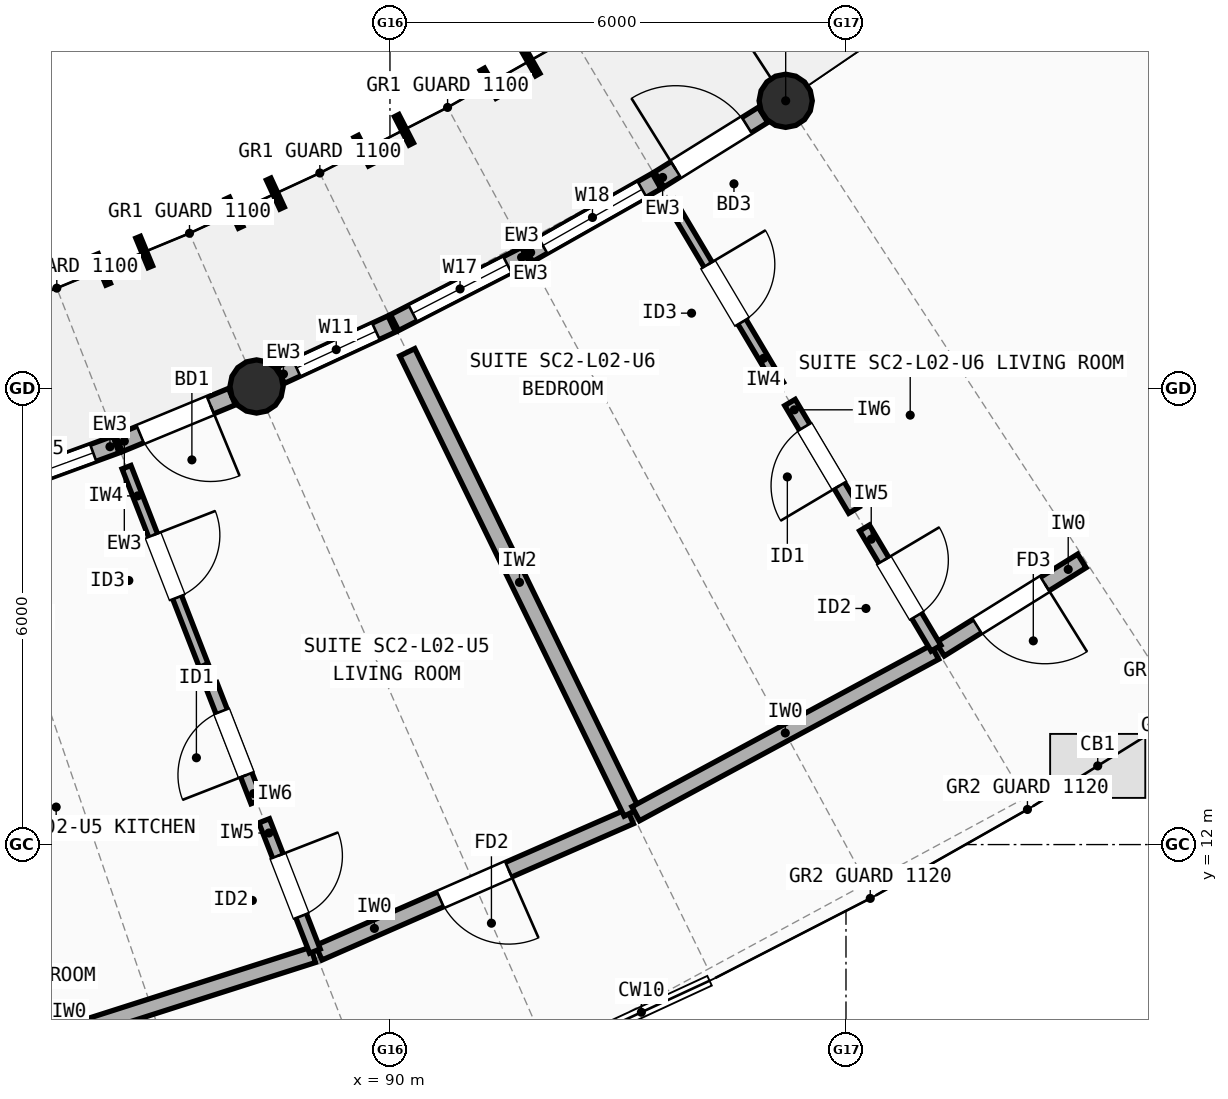
"""IFC4 building model, lengths in metres.
Left out: names, types, materials, properties, quantities, classifications, styles, units other than length and angle.
Written with IfcOpenShell. Run it as: python <this file> out.ifc"""

import sys

from ifc_helpers import new_model, si_unit, direction, frame, frame_2d, origin, origin_2d, place, context, subcontext, project, spatial, rectangle, circle, extrude, element, fill, save


model = new_model("IFC4")
c1 = context("Model", 3, precision=1e-05, world=origin(), true_north=direction((0.0, 1.0)))
c2 = subcontext(c1, "Body", "Model", "MODEL_VIEW")
j1 = project(units=[si_unit("LENGTHUNIT", "METRE"), si_unit("PLANEANGLEUNIT", "RADIAN")], contexts=[c1])
p1 = place(None, origin())
s1 = spatial("IfcSite", under=j1, at=p1, CompositionType="ELEMENT")
p2 = place(p1, origin())
s2 = spatial("IfcBuilding", under=s1, at=p2, CompositionType="ELEMENT")
p3 = place(p2, frame((0.0, 0.0, 7.7)))
s3 = spatial("IfcBuildingStorey", under=s2, at=p3, CompositionType="ELEMENT", Elevation=7.7)
for number, where, z_axis, x_axis in (
    (1, (88.245, 18.027, 0.0), (0.0, 0.0, 1.0), (1.0, 0.0, 0.0)),
    (2, (95.207, 21.785, 0.0), (0.0, 0.0, 1.0), (1.0, 0.0, 0.0)),
):
    element("IfcColumn", number, at=place(p3, frame(where, z_axis=z_axis, x_axis=x_axis)), inside=s3, PredefinedType="COLUMN", context=c2, shape_type="SweptSolid", body=[
        extrude(circle(Radius=0.35, at=origin_2d()), origin(), (0.0, 0.0, 1.0), 2.948),
    ])
p4 = place(p3, frame((84.574, 16.597, 0.0), z_axis=(0.0, 0.0, 1.0), x_axis=(0.939178301307, 0.343429932235, 0.0)))
e3 = element("IfcWall", 3, at=p4, inside=s3, PredefinedType="STANDARD", context=c2, shape_type="SweptSolid", body=[
    extrude(rectangle(XDim=1.94, YDim=0.235, at=frame_2d((0.97, 0.0))), origin(), (0.0, 0.0, 1.0), 2.684),
])
p5 = place(p4, frame((0.32, 0.0, 0.85)))
e4 = element("IfcOpeningElement", 4, at=p5, cuts=e3, PredefinedType="OPENING", context=c2, shape_type="SweptSolid", body=[
    extrude(rectangle(XDim=1.3, YDim=1.45, at=frame_2d((0.65, 0.725))), frame((0.0, 0.127, 0.0), z_axis=(0.0, -1.0, 0.0), x_axis=(1.0, 0.0, 0.0)), (0.0, 0.0, 1.0), 0.255),
])
p6 = place(p3, frame((86.433, 17.278, 0.0), z_axis=(0.0, 0.0, 1.0), x_axis=(0.924159027547, 0.382007973481, 0.0)))
e5 = element("IfcWall", 5, at=p6, inside=s3, PredefinedType="STANDARD", context=c2, shape_type="SweptSolid", body=[
    extrude(rectangle(XDim=1.61, YDim=0.235, at=frame_2d((0.805, 0.0))), origin(), (0.0, 0.0, 1.0), 2.684),
])
p7 = place(p6, frame((0.305, 0.0, 0.0)))
e6 = element("IfcOpeningElement", 6, at=p7, cuts=e5, PredefinedType="OPENING", context=c2, shape_type="SweptSolid", body=[
    extrude(rectangle(XDim=1.0, YDim=2.15, at=frame_2d((0.5, 1.075))), frame((0.0, 0.127, 0.0), z_axis=(0.0, -1.0, 0.0), x_axis=(1.0, 0.0, 0.0)), (0.0, 0.0, 1.0), 0.255),
])
p8 = place(p3, frame((88.562, 18.174, 0.0), z_axis=(0.0, 0.0, 1.0), x_axis=(0.907572868664, 0.419894615427, 0.0)))
e7 = element("IfcWall", 7, at=p8, inside=s3, PredefinedType="STANDARD", context=c2, shape_type="SweptSolid", body=[
    extrude(rectangle(XDim=1.61, YDim=0.235, at=frame_2d((0.805, 0.0))), origin(), (0.0, 0.0, 1.0), 2.684),
])
p9 = place(p8, frame((0.23, 0.0, 0.85)))
e8 = element("IfcOpeningElement", 8, at=p9, cuts=e7, PredefinedType="OPENING", context=c2, shape_type="SweptSolid", body=[
    extrude(rectangle(XDim=1.15, YDim=1.45, at=frame_2d((0.575, 0.725))), frame((0.0, 0.127, 0.0), z_axis=(0.0, -1.0, 0.0), x_axis=(1.0, 0.0, 0.0)), (0.0, 0.0, 1.0), 0.255),
])
p10 = place(p3, frame((90.06, 18.867, 0.0), z_axis=(0.0, 0.0, 1.0), x_axis=(0.889517261343, 0.456901566832, 0.0)))
e9 = element("IfcWall", 9, at=p10, inside=s3, PredefinedType="STANDARD", context=c2, shape_type="SweptSolid", body=[
    extrude(rectangle(XDim=1.94, YDim=0.235, at=frame_2d((0.97, 0.0))), origin(), (0.0, 0.0, 1.0), 2.684),
])
p11 = place(p10, frame((0.27, 0.0, 0.85)))
e10 = element("IfcOpeningElement", 10, at=p11, cuts=e9, PredefinedType="OPENING", context=c2, shape_type="SweptSolid", body=[
    extrude(rectangle(XDim=1.4, YDim=1.5, at=frame_2d((0.7, 0.75))), frame((0.0, 0.127, 0.0), z_axis=(0.0, -1.0, 0.0), x_axis=(1.0, 0.0, 0.0)), (0.0, 0.0, 1.0), 0.255),
])
p12 = place(p3, frame((91.821, 19.772, 0.0), z_axis=(0.0, 0.0, 1.0), x_axis=(0.86993400964, 0.493168144623, 0.0)))
e11 = element("IfcWall", 11, at=p12, inside=s3, PredefinedType="STANDARD", context=c2, shape_type="SweptSolid", body=[
    extrude(rectangle(XDim=1.94, YDim=0.235, at=frame_2d((0.97, 0.0))), origin(), (0.0, 0.0, 1.0), 2.684),
])
p13 = place(p12, frame((0.22, 0.0, 0.85)))
e12 = element("IfcOpeningElement", 12, at=p13, cuts=e11, PredefinedType="OPENING", context=c2, shape_type="SweptSolid", body=[
    extrude(rectangle(XDim=1.5, YDim=1.4, at=frame_2d((0.75, 0.7))), frame((0.0, 0.127, 0.0), z_axis=(0.0, -1.0, 0.0), x_axis=(1.0, 0.0, 0.0)), (0.0, 0.0, 1.0), 0.255),
])
p14 = place(p3, frame((93.543, 20.75, 0.0), z_axis=(0.0, 0.0, 1.0), x_axis=(0.848934138406, 0.528498655296, 0.0)))
e13 = element("IfcWall", 13, at=p14, inside=s3, PredefinedType="STANDARD", context=c2, shape_type="SweptSolid", body=[
    extrude(rectangle(XDim=1.61, YDim=0.235, at=frame_2d((0.805, 0.0))), origin(), (0.0, 0.0, 1.0), 2.684),
])
p15 = place(p14, frame((0.255, 0.0, 0.0)))
e14 = element("IfcOpeningElement", 14, at=p15, cuts=e13, PredefinedType="OPENING", context=c2, shape_type="SweptSolid", body=[
    extrude(rectangle(XDim=1.1, YDim=2.15, at=frame_2d((0.55, 1.075))), frame((0.0, 0.127, 0.0), z_axis=(0.0, -1.0, 0.0), x_axis=(1.0, 0.0, 0.0)), (0.0, 0.0, 1.0), 0.255),
])
p16 = place(p3, frame((82.562, 8.495, 0.0), z_axis=(0.0, 0.0, 1.0), x_axis=(0.952529122406, 0.304447484746, 0.0)))
e15 = element("IfcWall", 15, at=p16, inside=s3, PredefinedType="SOLIDWALL", context=c2, shape_type="SweptSolid", body=[
    extrude(rectangle(XDim=6.747, YDim=0.21, at=frame_2d((3.374, 0.0))), origin(), (0.0, 0.0, 1.0), 2.742),
])
p17 = place(p3, frame((89.064, 10.577, 0.0), z_axis=(0.0, 0.0, 1.0), x_axis=(0.91610596958, 0.40093621999, 0.0)))
e16 = element("IfcWall", 16, at=p17, inside=s3, PredefinedType="SOLIDWALL", context=c2, shape_type="SweptSolid", body=[
    extrude(rectangle(XDim=4.473, YDim=0.21, at=frame_2d((2.237, 0.0))), origin(), (0.0, 0.0, 1.0), 2.742),
])
p18 = place(p17, frame((1.747, 0.0, 0.0)))
e17 = element("IfcOpeningElement", 17, at=p18, cuts=e16, PredefinedType="OPENING", context=c2, shape_type="SweptSolid", body=[
    extrude(rectangle(XDim=0.98, YDim=2.15, at=frame_2d((0.49, 1.075))), frame((0.0, 0.115, 0.0), z_axis=(0.0, -1.0, 0.0), x_axis=(1.0, 0.0, 0.0)), (0.0, 0.0, 1.0), 0.23),
])
p19 = place(p3, frame((86.534, 16.965, 0.0), z_axis=(0.0, 0.0, 1.0), x_axis=(0.362896442288, -0.93182947591, 0.0)))
e18 = element("IfcWall", 18, at=p19, inside=s3, PredefinedType="PARTITIONING", context=c2, shape_type="SweptSolid", body=[
    extrude(rectangle(XDim=2.8, YDim=0.125, at=frame_2d((1.4, 0.0))), origin(), (0.0, 0.0, 1.0), 2.722),
])
p20 = place(p19, frame((0.96, 0.0, 0.0)))
e19 = element("IfcOpeningElement", 19, at=p20, cuts=e18, PredefinedType="OPENING", context=c2, shape_type="SweptSolid", body=[
    extrude(rectangle(XDim=0.88, YDim=2.1, at=frame_2d((0.44, 1.05))), frame((0.0, 0.073, 0.0), z_axis=(0.0, -1.0, 0.0), x_axis=(1.0, 0.0, 0.0)), (0.0, 0.0, 1.0), 0.145),
])
p21 = place(p3, frame((87.648, 14.102, 0.0), z_axis=(0.0, 0.0, 1.0), x_axis=(0.362817996081, -0.9318600226, 0.0)))
e20 = element("IfcWall", 20, at=p21, inside=s3, PredefinedType="PLUMBINGWALL", context=c2, shape_type="SweptSolid", body=[
    extrude(rectangle(XDim=1.648, YDim=0.16, at=frame_2d((0.824, 0.0))), origin(), (0.0, 0.0, 1.0), 2.722),
])
p22 = place(p21, frame((0.374, 0.0, 0.0)))
e21 = element("IfcOpeningElement", 21, at=p22, cuts=e20, PredefinedType="OPENING", context=c2, shape_type="SweptSolid", body=[
    extrude(rectangle(XDim=0.9, YDim=2.1, at=frame_2d((0.45, 1.05))), frame((0.0, 0.09, 0.0), z_axis=(0.0, -1.0, 0.0), x_axis=(1.0, 0.0, 0.0)), (0.0, 0.0, 1.0), 0.18),
])
p23 = place(p3, frame((88.345, 12.313, 0.0), z_axis=(0.0, 0.0, 1.0), x_axis=(0.362772804225, -0.931877616705, 0.0)))
e22 = element("IfcWall", 22, at=p23, inside=s3, PredefinedType="PARTITIONING", context=c2, shape_type="SweptSolid", body=[
    extrude(rectangle(XDim=1.84, YDim=0.15, at=frame_2d((0.92, 0.0))), origin(), (0.0, 0.0, 1.0), 2.722),
])
p24 = place(p23, frame((0.495, 0.0, 0.0)))
e23 = element("IfcOpeningElement", 23, at=p24, cuts=e22, PredefinedType="OPENING", context=c2, shape_type="SweptSolid", body=[
    extrude(rectangle(XDim=0.85, YDim=2.1, at=frame_2d((0.425, 1.05))), frame((0.0, 0.085, 0.0), z_axis=(0.0, -1.0, 0.0), x_axis=(1.0, 0.0, 0.0)), (0.0, 0.0, 1.0), 0.17),
])
p25 = place(p3, frame((90.228, 18.477, 0.0), z_axis=(0.0, 0.0, 1.0), x_axis=(0.438406494017, -0.898776805444, 0.0)))
e24 = element("IfcWall", 24, at=p25, inside=s3, PredefinedType="SOLIDWALL", context=c2, shape_type="SweptSolid", body=[
    extrude(rectangle(XDim=6.736, YDim=0.22, at=frame_2d((3.368, 0.0))), origin(), (0.0, 0.0, 1.0), 2.762),
])
p26 = place(p3, frame((93.233, 12.406, 0.0), z_axis=(0.0, 0.0, 1.0), x_axis=(0.879935975281, 0.475092285147, 0.0)))
e25 = element("IfcWall", 25, at=p26, inside=s3, PredefinedType="SOLIDWALL", context=c2, shape_type="SweptSolid", body=[
    extrude(rectangle(XDim=4.473, YDim=0.21, at=frame_2d((2.236, 0.0))), origin(), (0.0, 0.0, 1.0), 2.722),
])
p27 = place(p3, frame((97.239, 14.571, 0.0), z_axis=(0.0, 0.0, 1.0), x_axis=(0.848914783767, 0.528529743631, 0.0)))
e26 = element("IfcWall", 26, at=p27, inside=s3, PredefinedType="SOLIDWALL", context=c2, shape_type="SweptSolid", body=[
    extrude(rectangle(XDim=2.197, YDim=0.21, at=frame_2d((1.099, 0.0))), origin(), (0.0, 0.0, 1.0), 2.955),
])
p28 = place(p27, frame((0.573, 0.0, 0.0)))
e27 = element("IfcOpeningElement", 27, at=p28, cuts=e26, PredefinedType="OPENING", context=c2, shape_type="SweptSolid", body=[
    extrude(rectangle(XDim=1.05, YDim=2.15, at=frame_2d((0.525, 1.075))), frame((0.0, 0.115, 0.0), z_axis=(0.0, -1.0, 0.0), x_axis=(1.0, 0.0, 0.0)), (0.0, 0.0, 1.0), 0.23),
])
p29 = place(p3, frame((93.693, 20.457, 0.0), z_axis=(0.0, 0.0, 1.0), x_axis=(0.510939588664, -0.859616621952, 0.0)))
e28 = element("IfcWall", 28, at=p29, inside=s3, PredefinedType="PARTITIONING", context=c2, shape_type="SweptSolid", body=[
    extrude(rectangle(XDim=2.8, YDim=0.125, at=frame_2d((1.4, 0.0))), origin(), (0.0, 0.0, 1.0), 2.742),
])
p30 = place(p29, frame((0.96, 0.0, 0.0)))
e29 = element("IfcOpeningElement", 29, at=p30, cuts=e28, PredefinedType="OPENING", context=c2, shape_type="SweptSolid", body=[
    extrude(rectangle(XDim=0.88, YDim=2.1, at=frame_2d((0.44, 1.05))), frame((0.0, 0.073, 0.0), z_axis=(0.0, -1.0, 0.0), x_axis=(1.0, 0.0, 0.0)), (0.0, 0.0, 1.0), 0.145),
])
p31 = place(p3, frame((95.263, 17.816, 0.0), z_axis=(0.0, 0.0, 1.0), x_axis=(0.510918615189, -0.859629087835, 0.0)))
e30 = element("IfcWall", 30, at=p31, inside=s3, PredefinedType="PLUMBINGWALL", context=c2, shape_type="SweptSolid", body=[
    extrude(rectangle(XDim=1.648, YDim=0.16, at=frame_2d((0.824, 0.0))), origin(), (0.0, 0.0, 1.0), 2.742),
])
p32 = place(p31, frame((0.374, 0.0, 0.0)))
e31 = element("IfcOpeningElement", 31, at=p32, cuts=e30, PredefinedType="OPENING", context=c2, shape_type="SweptSolid", body=[
    extrude(rectangle(XDim=0.9, YDim=2.1, at=frame_2d((0.45, 1.05))), frame((0.0, 0.09, 0.0), z_axis=(0.0, -1.0, 0.0), x_axis=(1.0, 0.0, 0.0)), (0.0, 0.0, 1.0), 0.18),
])
p33 = place(p3, frame((96.244, 16.166, 0.0), z_axis=(0.0, 0.0, 1.0), x_axis=(0.510998553825, -0.859581571457, 0.0)))
e32 = element("IfcWall", 32, at=p33, inside=s3, PredefinedType="PARTITIONING", context=c2, shape_type="SweptSolid", body=[
    extrude(rectangle(XDim=1.84, YDim=0.15, at=frame_2d((0.92, 0.0))), origin(), (0.0, 0.0, 1.0), 2.742),
])
p34 = place(p33, frame((0.495, 0.0, 0.0)))
e33 = element("IfcOpeningElement", 33, at=p34, cuts=e32, PredefinedType="OPENING", context=c2, shape_type="SweptSolid", body=[
    extrude(rectangle(XDim=0.85, YDim=2.1, at=frame_2d((0.425, 1.05))), frame((0.0, 0.085, 0.0), z_axis=(0.0, -1.0, 0.0), x_axis=(1.0, 0.0, 0.0)), (0.0, 0.0, 1.0), 0.17),
])
p35 = place(p5, origin())
e34 = element("IfcWindow", 34, at=p35, inside=s3, PartitioningType="SINGLE_PANEL", PredefinedType="WINDOW", context=c2, shape_type="SweptSolid", body=[
    extrude(rectangle(XDim=1.3, YDim=1.45, at=frame_2d((0.65, 0.725))), frame((0.0, 0.03, 0.0), z_axis=(0.0, -1.0, 0.0), x_axis=(1.0, 0.0, 0.0)), (0.0, 0.0, 1.0), 0.06),
])
fill(e4, e34)
p36 = place(p7, origin())
e35 = element("IfcDoor", 35, at=p36, inside=s3, OperationType="SINGLE_SWING_RIGHT", PredefinedType="DOOR", context=c2, shape_type="SweptSolid", body=[
    extrude(rectangle(XDim=1.0, YDim=2.15, at=frame_2d((0.5, 1.075))), frame((0.0, 0.025, 0.0), z_axis=(0.0, -1.0, 0.0), x_axis=(1.0, 0.0, 0.0)), (0.0, 0.0, 1.0), 0.05),
])
fill(e6, e35)
p37 = place(p9, origin())
e36 = element("IfcWindow", 36, at=p37, inside=s3, PartitioningType="SINGLE_PANEL", PredefinedType="WINDOW", context=c2, shape_type="SweptSolid", body=[
    extrude(rectangle(XDim=1.15, YDim=1.45, at=frame_2d((0.575, 0.725))), frame((0.0, 0.03, 0.0), z_axis=(0.0, -1.0, 0.0), x_axis=(1.0, 0.0, 0.0)), (0.0, 0.0, 1.0), 0.06),
])
fill(e8, e36)
p38 = place(p11, origin())
e37 = element("IfcWindow", 37, at=p38, inside=s3, PartitioningType="SINGLE_PANEL", PredefinedType="WINDOW", context=c2, shape_type="SweptSolid", body=[
    extrude(rectangle(XDim=1.4, YDim=1.5, at=frame_2d((0.7, 0.75))), frame((0.0, 0.03, 0.0), z_axis=(0.0, -1.0, 0.0), x_axis=(1.0, 0.0, 0.0)), (0.0, 0.0, 1.0), 0.06),
])
fill(e10, e37)
p39 = place(p13, origin())
e38 = element("IfcWindow", 38, at=p39, inside=s3, PartitioningType="SINGLE_PANEL", PredefinedType="WINDOW", context=c2, shape_type="SweptSolid", body=[
    extrude(rectangle(XDim=1.5, YDim=1.4, at=frame_2d((0.75, 0.7))), frame((0.0, 0.03, 0.0), z_axis=(0.0, -1.0, 0.0), x_axis=(1.0, 0.0, 0.0)), (0.0, 0.0, 1.0), 0.06),
])
fill(e12, e38)
p40 = place(p15, origin())
e39 = element("IfcDoor", 39, at=p40, inside=s3, OperationType="SINGLE_SWING_LEFT", PredefinedType="DOOR", context=c2, shape_type="SweptSolid", body=[
    extrude(rectangle(XDim=1.1, YDim=2.15, at=frame_2d((0.55, 1.075))), frame((0.0, 0.025, 0.0), z_axis=(0.0, -1.0, 0.0), x_axis=(1.0, 0.0, 0.0)), (0.0, 0.0, 1.0), 0.05),
])
fill(e14, e39)
p41 = place(p18, origin())
e40 = element("IfcDoor", 40, at=p41, inside=s3, OperationType="SINGLE_SWING_RIGHT", PredefinedType="DOOR", context=c2, shape_type="SweptSolid", body=[
    extrude(rectangle(XDim=0.98, YDim=2.15, at=frame_2d((0.49, 1.075))), frame((0.0, 0.025, 0.0), z_axis=(0.0, -1.0, 0.0), x_axis=(1.0, 0.0, 0.0)), (0.0, 0.0, 1.0), 0.05),
])
fill(e17, e40)
p42 = place(p20, origin())
e41 = element("IfcDoor", 41, at=p42, inside=s3, OperationType="SINGLE_SWING_LEFT", PredefinedType="DOOR", context=c2, shape_type="SweptSolid", body=[
    extrude(rectangle(XDim=0.88, YDim=2.1, at=frame_2d((0.44, 1.05))), frame((0.0, 0.025, 0.0), z_axis=(0.0, -1.0, 0.0), x_axis=(1.0, 0.0, 0.0)), (0.0, 0.0, 1.0), 0.05),
])
fill(e19, e41)
p43 = place(p22, origin())
e42 = element("IfcDoor", 42, at=p43, inside=s3, OperationType="SINGLE_SWING_RIGHT", PredefinedType="DOOR", context=c2, shape_type="SweptSolid", body=[
    extrude(rectangle(XDim=0.9, YDim=2.1, at=frame_2d((0.45, 1.05))), frame((0.0, 0.025, 0.0), z_axis=(0.0, -1.0, 0.0), x_axis=(1.0, 0.0, 0.0)), (0.0, 0.0, 1.0), 0.05),
])
fill(e21, e42)
p44 = place(p24, origin())
e43 = element("IfcDoor", 43, at=p44, inside=s3, OperationType="SINGLE_SWING_LEFT", PredefinedType="DOOR", context=c2, shape_type="SweptSolid", body=[
    extrude(rectangle(XDim=0.85, YDim=2.1, at=frame_2d((0.425, 1.05))), frame((0.0, 0.025, 0.0), z_axis=(0.0, -1.0, 0.0), x_axis=(1.0, 0.0, 0.0)), (0.0, 0.0, 1.0), 0.05),
])
fill(e23, e43)
p45 = place(p28, origin())
e44 = element("IfcDoor", 44, at=p45, inside=s3, OperationType="SINGLE_SWING_RIGHT", PredefinedType="DOOR", context=c2, shape_type="SweptSolid", body=[
    extrude(rectangle(XDim=1.05, YDim=2.15, at=frame_2d((0.525, 1.075))), frame((0.0, 0.025, 0.0), z_axis=(0.0, -1.0, 0.0), x_axis=(1.0, 0.0, 0.0)), (0.0, 0.0, 1.0), 0.05),
])
fill(e27, e44)
p46 = place(p30, origin())
e45 = element("IfcDoor", 45, at=p46, inside=s3, OperationType="SINGLE_SWING_LEFT", PredefinedType="DOOR", context=c2, shape_type="SweptSolid", body=[
    extrude(rectangle(XDim=0.88, YDim=2.1, at=frame_2d((0.44, 1.05))), frame((0.0, 0.025, 0.0), z_axis=(0.0, -1.0, 0.0), x_axis=(1.0, 0.0, 0.0)), (0.0, 0.0, 1.0), 0.05),
])
fill(e29, e45)
p47 = place(p32, origin())
e46 = element("IfcDoor", 46, at=p47, inside=s3, OperationType="SINGLE_SWING_RIGHT", PredefinedType="DOOR", context=c2, shape_type="SweptSolid", body=[
    extrude(rectangle(XDim=0.9, YDim=2.1, at=frame_2d((0.45, 1.05))), frame((0.0, 0.025, 0.0), z_axis=(0.0, -1.0, 0.0), x_axis=(1.0, 0.0, 0.0)), (0.0, 0.0, 1.0), 0.05),
])
fill(e31, e46)
p48 = place(p34, origin())
e47 = element("IfcDoor", 47, at=p48, inside=s3, OperationType="SINGLE_SWING_LEFT", PredefinedType="DOOR", context=c2, shape_type="SweptSolid", body=[
    extrude(rectangle(XDim=0.85, YDim=2.1, at=frame_2d((0.425, 1.05))), frame((0.0, 0.025, 0.0), z_axis=(0.0, -1.0, 0.0), x_axis=(1.0, 0.0, 0.0)), (0.0, 0.0, 1.0), 0.05),
])
fill(e33, e47)
save(model, sys.argv[1])
